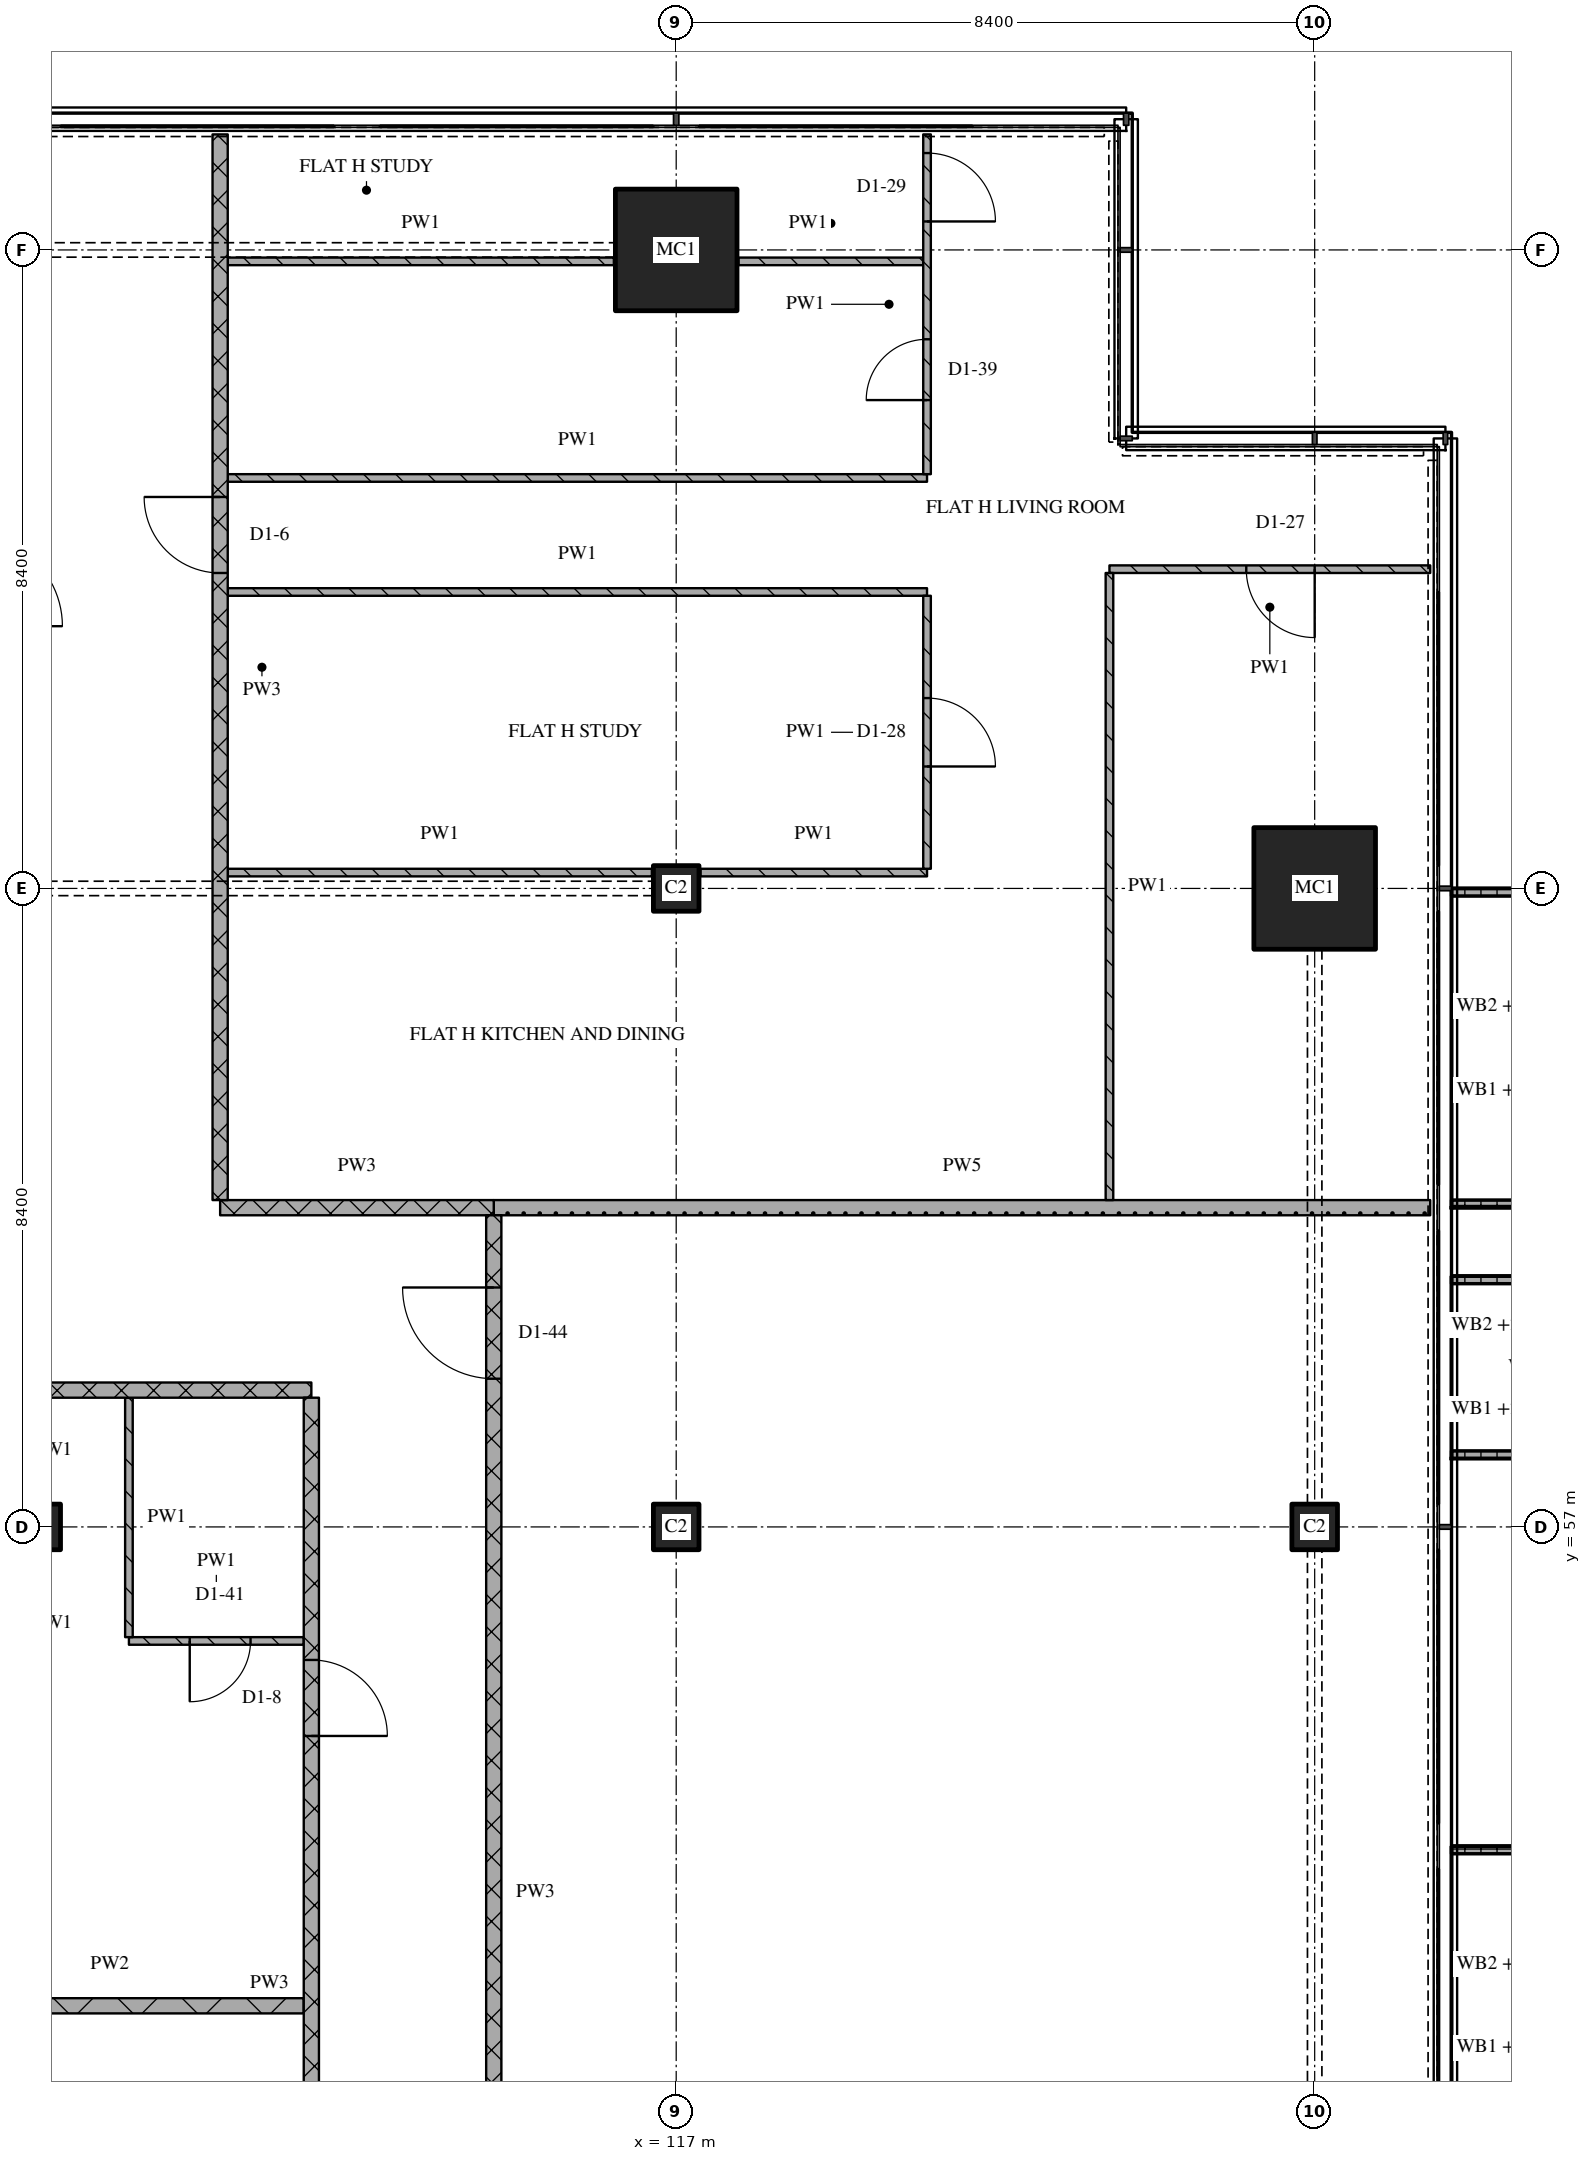
"""IFC4 building model, lengths in metres.
Left out: names, types, materials, properties, quantities, classifications, styles, units other than length and angle.
Written with IfcOpenShell. Run it as: python <this file> out.ifc"""

import sys

from ifc_helpers import new_model, si_unit, direction, frame, frame_2d, origin, origin_2d, place, context, subcontext, project, spatial, polyline, rectangle, outline, extrude, element, fill, save


model = new_model("IFC4")
c1 = context("Model", 3, precision=1e-05, world=origin(), true_north=direction((0.0, 1.0)))
c2 = subcontext(c1, "Body", "Model", "MODEL_VIEW")
j1 = project(units=[si_unit("LENGTHUNIT", "METRE"), si_unit("PLANEANGLEUNIT", "RADIAN")], contexts=[c1])
p1 = place(None, origin())
s1 = spatial("IfcSite", under=j1, at=p1, CompositionType="ELEMENT")
p2 = place(p1, origin())
s2 = spatial("IfcBuilding", under=s1, at=p2, CompositionType="ELEMENT")
p3 = place(p2, frame((0.0, 0.0, 212.7)))
s3 = spatial("IfcBuildingStorey", under=s2, at=p3, CompositionType="ELEMENT", Elevation=212.7)
for number, where, z_axis, x_axis in (
    (1, (108.6, 57.0, 0.0), (0.0, 0.0, 1.0), (1.0, 0.0, 0.0)),
    (2, (117.0, 57.0, 0.0), (0.0, 0.0, 1.0), (1.0, 0.0, 0.0)),
    (3, (117.0, 65.4, 0.0), (0.0, 0.0, 1.0), (1.0, 0.0, 0.0)),
):
    element("IfcColumn", number, at=place(p3, frame(where, z_axis=z_axis, x_axis=x_axis)), inside=s3, PredefinedType="COLUMN", context=c2, shape_type="SweptSolid", body=[
        extrude(rectangle(XDim=0.6, YDim=0.6, at=origin_2d()), origin(), (0.0, 0.0, 1.0), 3.6),
    ])
p4 = place(p3, frame((117.0, 73.8, 0.0), z_axis=(0.0, 0.0, 1.0), x_axis=(1.0, 0.0, 0.0)))
e4 = element("IfcColumn", 4, at=p4, inside=s3, PredefinedType="COLUMN", context=c2, shape_type="SweptSolid", body=[
    extrude(rectangle(XDim=1.6, YDim=1.6, at=origin_2d()), origin(), (0.0, 0.0, 1.0), 3.6),
])
p5 = place(p3, frame((125.4, 57.0, 0.0), z_axis=(0.0, 0.0, 1.0), x_axis=(1.0, 0.0, 0.0)))
e5 = element("IfcColumn", 5, at=p5, inside=s3, PredefinedType="COLUMN", context=c2, shape_type="SweptSolid", body=[
    extrude(rectangle(XDim=0.6, YDim=0.6, at=origin_2d()), origin(), (0.0, 0.0, 1.0), 3.6),
])
p6 = place(p3, frame((125.4, 65.4, 0.0), z_axis=(0.0, 0.0, 1.0), x_axis=(1.0, 0.0, 0.0)))
e6 = element("IfcColumn", 6, at=p6, inside=s3, PredefinedType="COLUMN", context=c2, shape_type="SweptSolid", body=[
    extrude(rectangle(XDim=1.6, YDim=1.6, at=origin_2d()), origin(), (0.0, 0.0, 1.0), 3.6),
])
p7 = place(p3, origin())
e7 = element("IfcWall", 7, at=p7, inside=s3, PredefinedType="SOLIDWALL", context=c2, shape_type="SweptSolid", body=[
    extrude(outline(polyline([(127.2, 48.6), (127.2, 48.7), (128.833, 48.7), (128.833, 52.7), (127.2, 52.7), (127.2, 52.8), (128.933, 52.8), (128.933, 48.6), (127.2, 48.6)])), origin(), (0.0, 0.0, 1.0), 1.0),
])
p8 = place(p3, origin())
e8 = element("IfcWall", 8, at=p8, inside=s3, PredefinedType="SOLIDWALL", context=c2, shape_type="SweptSolid", body=[
    extrude(outline(polyline([(127.2, 57.9), (127.2, 58.0), (128.7, 58.0), (128.7, 60.2), (127.2, 60.2), (127.2, 60.3), (128.8, 60.3), (128.8, 57.9), (127.2, 57.9)])), origin(), (0.0, 0.0, 1.0), 1.0),
])
p9 = place(p3, origin())
e9 = element("IfcWall", 9, at=p9, inside=s3, PredefinedType="SOLIDWALL", context=c2, shape_type="SweptSolid", body=[
    extrude(outline(polyline([(127.2, 61.2), (127.2, 61.3), (128.833, 61.3), (128.833, 65.3), (127.2, 65.3), (127.2, 65.4), (128.933, 65.4), (128.933, 61.2), (127.2, 61.2)])), origin(), (0.0, 0.0, 1.0), 1.0),
])
p10 = place(p3, frame((107.0, 50.7, 0.0), z_axis=(0.0, 0.0, 1.0), x_axis=(1.0, 0.0, 0.0)))
e10 = element("IfcWall", 10, at=p10, inside=s3, PredefinedType="PARTITIONING", context=c2, shape_type="SweptSolid", body=[
    extrude(rectangle(XDim=5.1, YDim=0.2, at=frame_2d((2.55, 0.0))), origin(), (0.0, 0.0, 1.0), 3.32),
])
p11 = place(p3, frame((109.8, 55.5, 0.0), z_axis=(0.0, 0.0, 1.0), x_axis=(1.0, 0.0, 0.0)))
e11 = element("IfcWall", 11, at=p11, inside=s3, PredefinedType="PARTITIONING", context=c2, shape_type="SweptSolid", body=[
    extrude(rectangle(XDim=2.3, YDim=0.1, at=frame_2d((1.15, 0.0))), origin(), (0.0, 0.0, 1.0), 3.32),
])
p12 = place(p11, frame((0.8, 0.0, 0.0)))
e12 = element("IfcOpeningElement", 12, at=p12, cuts=e11, PredefinedType="OPENING", context=c2, shape_type="SweptSolid", body=[
    extrude(rectangle(XDim=0.8, YDim=2.1, at=frame_2d((0.4, 1.05))), frame((0.0, 0.06, 0.0), z_axis=(0.0, -1.0, 0.0), x_axis=(1.0, 0.0, 0.0)), (0.0, 0.0, 1.0), 0.12),
])
p13 = place(p3, frame((101.4, 58.8, 0.0), z_axis=(0.0, 0.0, 1.0), x_axis=(1.0, 0.0, 0.0)))
e13 = element("IfcWall", 13, at=p13, inside=s3, PredefinedType="PARTITIONING", context=c2, shape_type="SweptSolid", body=[
    extrude(rectangle(XDim=10.8, YDim=0.2, at=frame_2d((5.4, 0.0))), origin(), (0.0, 0.0, 1.0), 3.32),
])
p14 = place(p3, frame((111.0, 61.2, 0.0), z_axis=(0.0, 0.0, 1.0), x_axis=(1.0, 0.0, 0.0)))
e14 = element("IfcWall", 14, at=p14, inside=s3, PredefinedType="PARTITIONING", context=c2, shape_type="SweptSolid", body=[
    extrude(rectangle(XDim=3.6, YDim=0.2, at=frame_2d((1.8, 0.0))), origin(), (0.0, 0.0, 1.0), 3.32),
])
p15 = place(p3, frame((114.6, 61.2, 0.0), z_axis=(0.0, 0.0, 1.0), x_axis=(1.0, 0.0, 0.0)))
e15 = element("IfcWall", 15, at=p15, inside=s3, PredefinedType="PARTITIONING", context=c2, shape_type="SweptSolid", body=[
    extrude(rectangle(XDim=12.32, YDim=0.2, at=frame_2d((6.16, 0.0))), origin(), (0.0, 0.0, 1.0), 3.32),
])
p16 = place(p3, frame((111.1, 65.609, 0.0), z_axis=(0.0, 0.0, 1.0), x_axis=(1.0, 0.0, 0.0)))
e16 = element("IfcWall", 16, at=p16, inside=s3, PredefinedType="PARTITIONING", context=c2, shape_type="SweptSolid", body=[
    extrude(rectangle(XDim=5.58, YDim=0.1, at=frame_2d((2.79, 0.0))), origin(), (0.0, 0.0, 1.0), 3.32),
])
p17 = place(p3, frame((117.32, 65.609, 0.0), z_axis=(0.0, 0.0, 1.0), x_axis=(1.0, 0.0, 0.0)))
e17 = element("IfcWall", 17, at=p17, inside=s3, PredefinedType="PARTITIONING", context=c2, shape_type="SweptSolid", body=[
    extrude(rectangle(XDim=2.98, YDim=0.1, at=frame_2d((1.49, 0.0))), origin(), (0.0, 0.0, 1.0), 3.32),
])
p18 = place(p3, frame((111.1, 69.3, 0.0), z_axis=(0.0, 0.0, 1.0), x_axis=(1.0, 0.0, 0.0)))
e18 = element("IfcWall", 18, at=p18, inside=s3, PredefinedType="PARTITIONING", context=c2, shape_type="SweptSolid", body=[
    extrude(rectangle(XDim=9.2, YDim=0.1, at=frame_2d((4.6, 0.0))), origin(), (0.0, 0.0, 1.0), 3.32),
])
p19 = place(p3, frame((126.92, 69.6, 0.0), z_axis=(0.0, 0.0, 1.0), x_axis=(-1.0, 0.0, 0.0)))
e19 = element("IfcWall", 19, at=p19, inside=s3, PredefinedType="PARTITIONING", context=c2, shape_type="SweptSolid", body=[
    extrude(rectangle(XDim=4.22, YDim=0.1, at=frame_2d((2.11, 0.0))), origin(), (0.0, 0.0, 1.0), 3.32),
])
p20 = place(p19, frame((1.52, 0.0, 0.0)))
e20 = element("IfcOpeningElement", 20, at=p20, cuts=e19, PredefinedType="OPENING", context=c2, shape_type="SweptSolid", body=[
    extrude(rectangle(XDim=0.9, YDim=2.1, at=frame_2d((0.45, 1.05))), frame((0.0, 0.06, 0.0), z_axis=(0.0, -1.0, 0.0), x_axis=(1.0, 0.0, 0.0)), (0.0, 0.0, 1.0), 0.12),
])
p21 = place(p3, frame((111.1, 70.8, 0.0), z_axis=(0.0, 0.0, 1.0), x_axis=(1.0, 0.0, 0.0)))
e21 = element("IfcWall", 21, at=p21, inside=s3, PredefinedType="PARTITIONING", context=c2, shape_type="SweptSolid", body=[
    extrude(rectangle(XDim=9.2, YDim=0.1, at=frame_2d((4.6, 0.0))), origin(), (0.0, 0.0, 1.0), 3.32),
])
p22 = place(p3, frame((111.1, 73.649, 0.0), z_axis=(0.0, 0.0, 1.0), x_axis=(1.0, 0.0, 0.0)))
e22 = element("IfcWall", 22, at=p22, inside=s3, PredefinedType="PARTITIONING", context=c2, shape_type="SweptSolid", body=[
    extrude(rectangle(XDim=5.08, YDim=0.1, at=frame_2d((2.54, 0.0))), origin(), (0.0, 0.0, 1.0), 3.32),
])
p23 = place(p3, frame((117.82, 73.649, 0.0), z_axis=(0.0, 0.0, 1.0), x_axis=(1.0, 0.0, 0.0)))
e23 = element("IfcWall", 23, at=p23, inside=s3, PredefinedType="PARTITIONING", context=c2, shape_type="SweptSolid", body=[
    extrude(rectangle(XDim=2.43, YDim=0.1, at=frame_2d((1.215, 0.0))), origin(), (0.0, 0.0, 1.0), 3.32),
])
p24 = place(p3, frame((109.8, 58.7, 0.0), z_axis=(0.0, 0.0, 1.0), x_axis=(0.0, -1.0, 0.0)))
e24 = element("IfcWall", 24, at=p24, inside=s3, PredefinedType="PARTITIONING", context=c2, shape_type="SweptSolid", body=[
    extrude(rectangle(XDim=3.15, YDim=0.1, at=frame_2d((1.575, 0.0))), origin(), (0.0, 0.0, 1.0), 3.32),
])
p25 = place(p3, frame((111.0, 75.32, 0.0), z_axis=(0.0, 0.0, 1.0), x_axis=(0.0, -1.0, 0.0)))
e25 = element("IfcWall", 25, at=p25, inside=s3, PredefinedType="PARTITIONING", context=c2, shape_type="SweptSolid", body=[
    extrude(rectangle(XDim=14.02, YDim=0.2, at=frame_2d((7.01, 0.0))), origin(), (0.0, 0.0, 1.0), 3.32),
])
p26 = place(p25, frame((4.77, 0.0, 0.0)))
e26 = element("IfcOpeningElement", 26, at=p26, cuts=e25, PredefinedType="OPENING", context=c2, shape_type="SweptSolid", body=[
    extrude(rectangle(XDim=1.0, YDim=2.1, at=frame_2d((0.5, 1.05))), frame((0.0, 0.11, 0.0), z_axis=(0.0, -1.0, 0.0), x_axis=(1.0, 0.0, 0.0)), (0.0, 0.0, 1.0), 0.22),
])
p27 = place(p3, frame((112.2, 43.3, 0.0), z_axis=(0.0, 0.0, 1.0), x_axis=(0.0, 1.0, 0.0)))
e27 = element("IfcWall", 27, at=p27, inside=s3, PredefinedType="PARTITIONING", context=c2, shape_type="SweptSolid", body=[
    extrude(rectangle(XDim=15.4, YDim=0.2, at=frame_2d((7.7, 0.0))), origin(), (0.0, 0.0, 1.0), 3.32),
])
p28 = place(p27, frame((10.95, 0.0, 0.0)))
e28 = element("IfcOpeningElement", 28, at=p28, cuts=e27, PredefinedType="OPENING", context=c2, shape_type="SweptSolid", body=[
    extrude(rectangle(XDim=1.0, YDim=2.1, at=frame_2d((0.5, 1.05))), frame((0.0, 0.11, 0.0), z_axis=(0.0, -1.0, 0.0), x_axis=(1.0, 0.0, 0.0)), (0.0, 0.0, 1.0), 0.22),
])
p29 = place(p3, frame((114.6, 61.1, 0.0), z_axis=(0.0, 0.0, 1.0), x_axis=(0.0, -1.0, 0.0)))
e29 = element("IfcWall", 29, at=p29, inside=s3, PredefinedType="PARTITIONING", context=c2, shape_type="SweptSolid", body=[
    extrude(rectangle(XDim=17.8, YDim=0.2, at=frame_2d((8.9, 0.0))), origin(), (0.0, 0.0, 1.0), 3.32),
])
p30 = place(p29, frame((0.95, 0.0, 0.0)))
e30 = element("IfcOpeningElement", 30, at=p30, cuts=e29, PredefinedType="OPENING", context=c2, shape_type="SweptSolid", body=[
    extrude(rectangle(XDim=1.2, YDim=2.1, at=frame_2d((0.6, 1.05))), frame((0.0, 0.11, 0.0), z_axis=(0.0, -1.0, 0.0), x_axis=(1.0, 0.0, 0.0)), (0.0, 0.0, 1.0), 0.22),
])
p31 = place(p3, frame((120.3, 65.659, 0.0), z_axis=(0.0, 0.0, 1.0), x_axis=(0.0, 1.0, 0.0)))
e31 = element("IfcWall", 31, at=p31, inside=s3, PredefinedType="PARTITIONING", context=c2, shape_type="SweptSolid", body=[
    extrude(rectangle(XDim=3.591, YDim=0.1, at=frame_2d((1.796, 0.0))), origin(), (0.0, 0.0, 1.0), 3.32),
])
p32 = place(p31, frame((1.346, 0.0, 0.0)))
e32 = element("IfcOpeningElement", 32, at=p32, cuts=e31, PredefinedType="OPENING", context=c2, shape_type="SweptSolid", body=[
    extrude(rectangle(XDim=0.9, YDim=2.1, at=frame_2d((0.45, 1.05))), frame((0.0, 0.06, 0.0), z_axis=(0.0, -1.0, 0.0), x_axis=(1.0, 0.0, 0.0)), (0.0, 0.0, 1.0), 0.12),
])
p33 = place(p3, frame((120.3, 70.85, 0.0), z_axis=(0.0, 0.0, 1.0), x_axis=(0.0, 1.0, 0.0)))
e33 = element("IfcWall", 33, at=p33, inside=s3, PredefinedType="PARTITIONING", context=c2, shape_type="SweptSolid", body=[
    extrude(rectangle(XDim=4.47, YDim=0.1, at=frame_2d((2.235, 0.0))), origin(), (0.0, 0.0, 1.0), 3.32),
])
p34 = place(p33, frame((0.975, 0.0, 0.0)))
e34 = element("IfcOpeningElement", 34, at=p34, cuts=e33, PredefinedType="OPENING", context=c2, shape_type="SweptSolid", body=[
    extrude(rectangle(XDim=0.8, YDim=2.1, at=frame_2d((0.4, 1.05))), frame((0.0, 0.06, 0.0), z_axis=(0.0, -1.0, 0.0), x_axis=(1.0, 0.0, 0.0)), (0.0, 0.0, 1.0), 0.12),
])
p35 = place(p33, frame((3.325, 0.0, 0.0)))
e35 = element("IfcOpeningElement", 35, at=p35, cuts=e33, PredefinedType="OPENING", context=c2, shape_type="SweptSolid", body=[
    extrude(rectangle(XDim=0.9, YDim=2.1, at=frame_2d((0.45, 1.05))), frame((0.0, 0.06, 0.0), z_axis=(0.0, -1.0, 0.0), x_axis=(1.0, 0.0, 0.0)), (0.0, 0.0, 1.0), 0.12),
])
p36 = place(p3, frame((122.7, 69.55, 0.0), z_axis=(0.0, 0.0, 1.0), x_axis=(0.0, -1.0, 0.0)))
e36 = element("IfcWall", 36, at=p36, inside=s3, PredefinedType="PARTITIONING", context=c2, shape_type="SweptSolid", body=[
    extrude(rectangle(XDim=8.25, YDim=0.1, at=frame_2d((4.125, 0.0))), origin(), (0.0, 0.0, 1.0), 3.32),
])
p37 = place(p12, origin())
e37 = element("IfcDoor", 37, at=p37, inside=s3, OperationType="SINGLE_SWING_RIGHT", PredefinedType="DOOR", context=c2, shape_type="SweptSolid", body=[
    extrude(rectangle(XDim=0.8, YDim=2.1, at=frame_2d((0.4, 1.05))), frame((0.0, 0.025, 0.0), z_axis=(0.0, -1.0, 0.0), x_axis=(1.0, 0.0, 0.0)), (0.0, 0.0, 1.0), 0.05),
])
fill(e12, e37)
p38 = place(p20, origin())
e38 = element("IfcDoor", 38, at=p38, inside=s3, OperationType="SINGLE_SWING_LEFT", PredefinedType="DOOR", context=c2, shape_type="SweptSolid", body=[
    extrude(rectangle(XDim=0.9, YDim=2.1, at=frame_2d((0.45, 1.05))), frame((0.0, 0.025, 0.0), z_axis=(0.0, -1.0, 0.0), x_axis=(1.0, 0.0, 0.0)), (0.0, 0.0, 1.0), 0.05),
])
fill(e20, e38)
p39 = place(p26, origin())
e39 = element("IfcDoor", 39, at=p39, inside=s3, OperationType="SINGLE_SWING_RIGHT", PredefinedType="DOOR", context=c2, shape_type="SweptSolid", body=[
    extrude(rectangle(XDim=1.0, YDim=2.1, at=frame_2d((0.5, 1.05))), frame((0.0, 0.025, 0.0), z_axis=(0.0, -1.0, 0.0), x_axis=(1.0, 0.0, 0.0)), (0.0, 0.0, 1.0), 0.05),
])
fill(e26, e39)
p40 = place(p28, origin())
e40 = element("IfcDoor", 40, at=p40, inside=s3, OperationType="SINGLE_SWING_RIGHT", PredefinedType="DOOR", context=c2, shape_type="SweptSolid", body=[
    extrude(rectangle(XDim=1.0, YDim=2.1, at=frame_2d((0.5, 1.05))), frame((0.0, 0.025, 0.0), z_axis=(0.0, -1.0, 0.0), x_axis=(1.0, 0.0, 0.0)), (0.0, 0.0, 1.0), 0.05),
])
fill(e28, e40)
p41 = place(p30, origin())
e41 = element("IfcDoor", 41, at=p41, inside=s3, OperationType="SINGLE_SWING_RIGHT", PredefinedType="DOOR", context=c2, shape_type="SweptSolid", body=[
    extrude(rectangle(XDim=1.2, YDim=2.1, at=frame_2d((0.6, 1.05))), frame((0.0, 0.025, 0.0), z_axis=(0.0, -1.0, 0.0), x_axis=(1.0, 0.0, 0.0)), (0.0, 0.0, 1.0), 0.05),
])
fill(e30, e41)
p42 = place(p32, origin())
e42 = element("IfcDoor", 42, at=p42, inside=s3, OperationType="SINGLE_SWING_RIGHT", PredefinedType="DOOR", context=c2, shape_type="SweptSolid", body=[
    extrude(rectangle(XDim=0.9, YDim=2.1, at=frame_2d((0.45, 1.05))), frame((0.0, 0.025, 0.0), z_axis=(0.0, -1.0, 0.0), x_axis=(1.0, 0.0, 0.0)), (0.0, 0.0, 1.0), 0.05),
])
fill(e32, e42)
p43 = place(p34, origin())
e43 = element("IfcDoor", 43, at=p43, inside=s3, OperationType="SINGLE_SWING_LEFT", PredefinedType="DOOR", context=c2, shape_type="SweptSolid", body=[
    extrude(rectangle(XDim=0.8, YDim=2.1, at=frame_2d((0.4, 1.05))), frame((0.0, 0.025, 0.0), z_axis=(0.0, -1.0, 0.0), x_axis=(1.0, 0.0, 0.0)), (0.0, 0.0, 1.0), 0.05),
])
fill(e34, e43)
p44 = place(p35, origin())
e44 = element("IfcDoor", 44, at=p44, inside=s3, OperationType="SINGLE_SWING_RIGHT", PredefinedType="DOOR", context=c2, shape_type="SweptSolid", body=[
    extrude(rectangle(XDim=0.9, YDim=2.1, at=frame_2d((0.45, 1.05))), frame((0.0, 0.025, 0.0), z_axis=(0.0, -1.0, 0.0), x_axis=(1.0, 0.0, 0.0)), (0.0, 0.0, 1.0), 0.05),
])
fill(e35, e44)
save(model, sys.argv[1])
